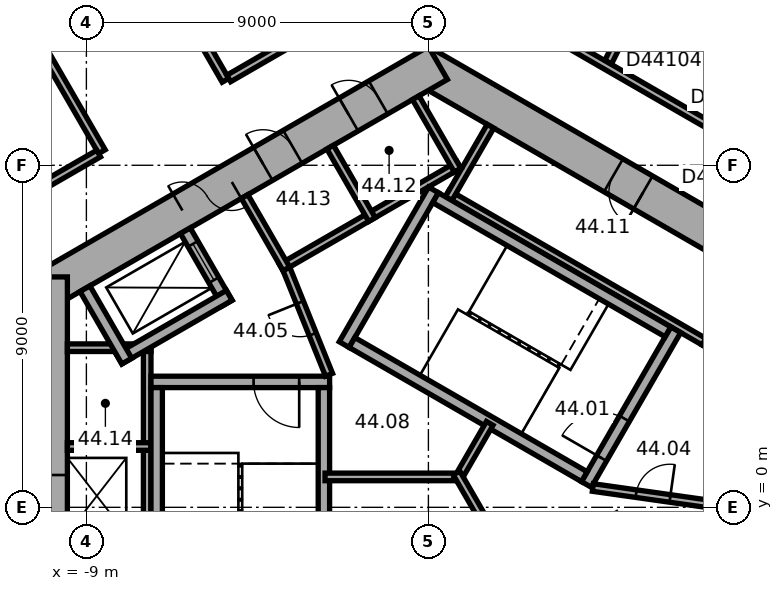
"""IFC4 building model, lengths in metres.
Left out: names, types, materials, properties, quantities, classifications, styles, units other than length and angle.
Written with IfcOpenShell. Run it as: python <this file> out.ifc"""

import sys

from ifc_helpers import new_model, si_unit, direction, frame, frame_2d, origin, place, context, subcontext, project, spatial, rectangle, extrude, element, fill, save


model = new_model("IFC4")
c1 = context("Model", 3, precision=1e-05, world=origin(), true_north=direction((0.0, 1.0)))
c2 = subcontext(c1, "Body", "Model", "MODEL_VIEW")
j1 = project(units=[si_unit("LENGTHUNIT", "METRE"), si_unit("PLANEANGLEUNIT", "RADIAN")], contexts=[c1])
p1 = place(None, origin())
s1 = spatial("IfcSite", under=j1, at=p1, CompositionType="ELEMENT")
p2 = place(p1, origin())
s2 = spatial("IfcBuilding", under=s1, at=p2, CompositionType="ELEMENT")
p3 = place(p2, frame((0.0, 0.0, 179.9)))
s3 = spatial("IfcBuildingStorey", under=s2, at=p3, CompositionType="ELEMENT", Elevation=179.9)
p4 = place(p3, frame((10.25, 5.629, 0.0), z_axis=(0.0, 0.0, 1.0), x_axis=(-0.866022616891, 0.50000482701, 0.0)))
e1 = element("IfcWall", 1, at=p4, inside=s3, PredefinedType="SHEAR", context=c2, shape_type="SweptSolid", body=[
    extrude(rectangle(XDim=12.125, YDim=1.0, at=frame_2d((6.062, 0.0))), origin(), (0.0, 0.0, 1.0), 3.7),
])
p5 = place(p4, frame((5.312, 0.0, 0.0)))
e2 = element("IfcOpeningElement", 2, at=p5, cuts=e1, PredefinedType="OPENING", context=c2, shape_type="SweptSolid", body=[
    extrude(rectangle(XDim=0.9, YDim=2.1, at=frame_2d((0.45, 1.05))), frame((0.0, 0.51, 0.0), z_axis=(0.0, -1.0, 0.0), x_axis=(1.0, 0.0, 0.0)), (0.0, 0.0, 1.0), 1.02),
])
p6 = place(p3, frame((0.25, 11.691, 0.0), z_axis=(0.0, 0.0, 1.0), x_axis=(-0.866022616891, -0.50000482701, 0.0)))
e3 = element("IfcWall", 3, at=p6, inside=s3, PredefinedType="SHEAR", context=c2, shape_type="SweptSolid", body=[
    extrude(rectangle(XDim=12.125, YDim=1.0, at=frame_2d((6.062, 0.0))), origin(), (0.0, 0.0, 1.0), 3.7),
])
p7 = place(p6, frame((6.262, 0.0, 0.0)))
e4 = element("IfcOpeningElement", 4, at=p7, cuts=e3, PredefinedType="OPENING", context=c2, shape_type="SweptSolid", body=[
    extrude(rectangle(XDim=1.5, YDim=2.1, at=frame_2d((0.75, 1.05))), frame((0.0, 0.51, 0.0), z_axis=(0.0, -1.0, 0.0), x_axis=(1.0, 0.0, 0.0)), (0.0, 0.0, 1.0), 1.02),
])
p8 = place(p6, frame((1.812, 0.0, 0.0)))
e5 = element("IfcOpeningElement", 5, at=p8, cuts=e3, PredefinedType="OPENING", context=c2, shape_type="SweptSolid", body=[
    extrude(rectangle(XDim=0.9, YDim=2.1, at=frame_2d((0.45, 1.05))), frame((0.0, 0.51, 0.0), z_axis=(0.0, -1.0, 0.0), x_axis=(1.0, 0.0, 0.0)), (0.0, 0.0, 1.0), 1.02),
])
p9 = place(p6, frame((4.412, 0.0, 0.0)))
e6 = element("IfcOpeningElement", 6, at=p9, cuts=e3, PredefinedType="OPENING", context=c2, shape_type="SweptSolid", body=[
    extrude(rectangle(XDim=0.9, YDim=2.1, at=frame_2d((0.45, 1.05))), frame((0.0, 0.51, 0.0), z_axis=(0.0, -1.0, 0.0), x_axis=(1.0, 0.0, 0.0)), (0.0, 0.0, 1.0), 1.02),
])
p10 = place(p3, frame((-10.0, 6.062, 0.0), z_axis=(0.0, 0.0, 1.0), x_axis=(0.0, -1.0, 0.0)))
e7 = element("IfcWall", 7, at=p10, inside=s3, PredefinedType="SHEAR", context=c2, shape_type="SweptSolid", body=[
    extrude(rectangle(XDim=12.125, YDim=1.0, at=frame_2d((6.062, 0.0))), origin(), (0.0, 0.0, 1.0), 3.7),
])
p11 = place(p10, frame((5.212, 0.0, 0.0)))
e8 = element("IfcOpeningElement", 8, at=p11, cuts=e7, PredefinedType="OPENING", context=c2, shape_type="SweptSolid", body=[
    extrude(rectangle(XDim=1.1, YDim=2.1, at=frame_2d((0.55, 1.05))), frame((0.0, 0.51, 0.0), z_axis=(0.0, -1.0, 0.0), x_axis=(1.0, 0.0, 0.0)), (0.0, 0.0, 1.0), 1.02),
])
p12 = place(p10, frame((7.812, 0.0, 0.0)))
e9 = element("IfcOpeningElement", 9, at=p12, cuts=e7, PredefinedType="OPENING", context=c2, shape_type="SweptSolid", body=[
    extrude(rectangle(XDim=1.1, YDim=2.1, at=frame_2d((0.55, 1.05))), frame((0.0, 0.51, 0.0), z_axis=(0.0, -1.0, 0.0), x_axis=(1.0, 0.0, 0.0)), (0.0, 0.0, 1.0), 1.02),
])
p13 = place(p3, frame((7.424, 4.259, 0.0), z_axis=(0.0, 0.0, 1.0), x_axis=(-0.866026010844, 0.49999894854, 0.0)))
e10 = element("IfcWall", 10, at=p13, inside=s3, PredefinedType="PARTITIONING", context=c2, shape_type="SweptSolid", body=[
    extrude(rectangle(XDim=8.0, YDim=0.2, at=frame_2d((4.0, 0.0))), origin(), (0.0, 0.0, 1.0), 3.42),
])
for number, where, z_axis, x_axis in (
    (11, (7.287, 4.222, 0.0), (0.0, 0.0, 1.0), (0.5, 0.866, 0.0)),
    (12, (0.532, 8.122, 0.0), (0.0, 0.0, 1.0), (0.5, 0.866, 0.0)),
):
    element("IfcWall", number, at=place(p3, frame(where, z_axis=z_axis, x_axis=x_axis)), inside=s3, PredefinedType="PARTITIONING", context=c2, shape_type="SweptSolid", body=[
        extrude(rectangle(XDim=2.2, YDim=0.2, at=frame_2d((1.1, 0.0))), origin(), (0.0, 0.0, 1.0), 3.42),
    ])
p14 = place(p3, frame((0.803, 9.009, 0.0), z_axis=(0.0, 0.0, 1.0), x_axis=(-0.866028230842, -0.499995103361, 0.0)))
e13 = element("IfcWall", 13, at=p14, inside=s3, PredefinedType="PARTITIONING", context=c2, shape_type="SweptSolid", body=[
    extrude(rectangle(XDim=5.4, YDim=0.2, at=frame_2d((2.7, 0.0))), origin(), (0.0, 0.0, 1.0), 3.42),
])
p15 = place(p3, frame((0.767, 8.872, 0.0), z_axis=(0.0, 0.0, 1.0), x_axis=(-0.499994660107, 0.866028486751, 0.0)))
e14 = element("IfcWall", 14, at=p15, inside=s3, PredefinedType="PARTITIONING", context=c2, shape_type="SweptSolid", body=[
    extrude(rectangle(XDim=2.2, YDim=0.2, at=frame_2d((1.1, 0.0))), origin(), (0.0, 0.0, 1.0), 3.42),
])
for number, where, z_axis, x_axis in (
    (15, (-1.485, 7.572, 0.0), (0.0, 0.0, 1.0), (-0.5, 0.866, 0.0)),
    (16, (-3.737, 6.272, 0.0), (0.0, 0.0, 1.0), (-0.5, 0.866, 0.0)),
):
    element("IfcWall", number, at=place(p3, frame(where, z_axis=z_axis, x_axis=x_axis)), inside=s3, PredefinedType="PARTITIONING", context=c2, shape_type="SweptSolid", body=[
        extrude(rectangle(XDim=2.2, YDim=0.2, at=frame_2d((1.1, 0.0))), origin(), (0.0, 0.0, 1.0), 3.42),
    ])
p16 = place(p3, frame((-7.4, 4.3, 0.0), z_axis=(0.0, 0.0, 1.0), x_axis=(0.0, -1.0, 0.0)))
e17 = element("IfcWall", 17, at=p16, inside=s3, PredefinedType="PARTITIONING", context=c2, shape_type="SweptSolid", body=[
    extrude(rectangle(XDim=8.0, YDim=0.2, at=frame_2d((4.0, 0.0))), origin(), (0.0, 0.0, 1.0), 3.42),
])
for number, where, z_axis, x_axis in (
    (18, (-7.3, 4.2, 0.0), (0.0, 0.0, 1.0), (-1.0, 0.0, 0.0)),
    (19, (-7.3, 1.6, 0.0), (0.0, 0.0, 1.0), (-1.0, 0.0, 0.0)),
):
    element("IfcWall", number, at=place(p3, frame(where, z_axis=z_axis, x_axis=x_axis)), inside=s3, PredefinedType="PARTITIONING", context=c2, shape_type="SweptSolid", body=[
        extrude(rectangle(XDim=2.2, YDim=0.2, at=frame_2d((1.1, 0.0))), origin(), (0.0, 0.0, 1.0), 3.42),
    ])
p17 = place(p3, frame((4.158, 0.602, 0.0), z_axis=(0.0, 0.0, 1.0), x_axis=(0.499977259774, 0.866038532462, 0.0)))
e20 = element("IfcWall", 20, at=p17, inside=s3, PredefinedType="SHEAR", context=c2, shape_type="SweptSolid", body=[
    extrude(rectangle(XDim=4.7, YDim=0.3, at=frame_2d((2.35, 0.0))), origin(), (0.0, 0.0, 1.0), 3.42),
])
p18 = place(p17, frame((0.8, 0.0, 0.0)))
e21 = element("IfcOpeningElement", 21, at=p18, cuts=e20, PredefinedType="OPENING", context=c2, shape_type="SweptSolid", body=[
    extrude(rectangle(XDim=1.2, YDim=2.1, at=frame_2d((0.6, 1.05))), frame((0.0, 0.16, 0.0), z_axis=(0.0, -1.0, 0.0), x_axis=(1.0, 0.0, 0.0)), (0.0, 0.0, 1.0), 0.32),
])
p19 = place(p3, frame((-2.216, 4.282, 0.0), z_axis=(0.0, 0.0, 1.0), x_axis=(0.499977259774, 0.866038532462, 0.0)))
e22 = element("IfcWall", 22, at=p19, inside=s3, PredefinedType="SHEAR", context=c2, shape_type="SweptSolid", body=[
    extrude(rectangle(XDim=4.7, YDim=0.3, at=frame_2d((2.35, 0.0))), origin(), (0.0, 0.0, 1.0), 3.42),
])
for number, where, z_axis, x_axis in (
    (23, (4.103, 0.807, 0.0), (0.0, 0.0, 1.0), (-0.866, 0.5, 0.0)),
    (24, (6.303, 4.617, 0.0), (0.0, 0.0, 1.0), (-0.866, 0.5, 0.0)),
):
    element("IfcWall", number, at=place(p3, frame(where, z_axis=z_axis, x_axis=x_axis)), inside=s3, PredefinedType="SHEAR", context=c2, shape_type="SweptSolid", body=[
        extrude(rectangle(XDim=7.06, YDim=0.3, at=frame_2d((3.53, 0.0))), origin(), (0.0, 0.0, 1.0), 3.42),
    ])
p20 = place(p3, frame((-2.6, 3.3, 0.0), z_axis=(0.0, 0.0, 1.0), x_axis=(-1.0, 0.0, 0.0)))
e25 = element("IfcWall", 25, at=p20, inside=s3, PredefinedType="SHEAR", context=c2, shape_type="SweptSolid", body=[
    extrude(rectangle(XDim=4.7, YDim=0.3, at=frame_2d((2.35, 0.0))), origin(), (0.0, 0.0, 1.0), 3.42),
])
p21 = place(p20, frame((0.8, 0.0, 0.0)))
e26 = element("IfcOpeningElement", 26, at=p21, cuts=e25, PredefinedType="OPENING", context=c2, shape_type="SweptSolid", body=[
    extrude(rectangle(XDim=1.2, YDim=2.1, at=frame_2d((0.6, 1.05))), frame((0.0, 0.16, 0.0), z_axis=(0.0, -1.0, 0.0), x_axis=(1.0, 0.0, 0.0)), (0.0, 0.0, 1.0), 0.32),
])
for number, where, z_axis, x_axis in (
    (27, (-2.75, 3.15, 0.0), (0.0, 0.0, 1.0), (0.0, -1.0, 0.0)),
    (28, (-7.15, 3.15, 0.0), (0.0, 0.0, 1.0), (0.0, -1.0, 0.0)),
):
    element("IfcWall", number, at=place(p3, frame(where, z_axis=z_axis, x_axis=x_axis)), inside=s3, PredefinedType="SHEAR", context=c2, shape_type="SweptSolid", body=[
        extrude(rectangle(XDim=7.06, YDim=0.3, at=frame_2d((3.53, 0.0))), origin(), (0.0, 0.0, 1.0), 3.42),
    ])
p22 = place(p3, frame((4.327, 0.521, 0.0), z_axis=(0.0, 0.0, 1.0), x_axis=(0.990124376366, -0.14019172346, 0.0)))
e29 = element("IfcWall", 29, at=p22, inside=s3, PredefinedType="PARTITIONING", context=c2, shape_type="SweptSolid", body=[
    extrude(rectangle(XDim=3.002, YDim=0.2, at=frame_2d((1.501, 0.0))), origin(), (0.0, 0.0, 1.0), 3.42),
])
p23 = place(p22, frame((1.15, 0.0, 0.0)))
e30 = element("IfcOpeningElement", 30, at=p23, cuts=e29, PredefinedType="OPENING", context=c2, shape_type="SweptSolid", body=[
    extrude(rectangle(XDim=0.9, YDim=2.1, at=frame_2d((0.45, 1.05))), frame((0.0, 0.11, 0.0), z_axis=(0.0, -1.0, 0.0), x_axis=(1.0, 0.0, 0.0)), (0.0, 0.0, 1.0), 0.22),
])
p24 = place(p3, frame((-5.295, 5.372, 0.0), z_axis=(0.0, 0.0, 1.0), x_axis=(-0.500077893725, 0.86598042715, 0.0)))
e31 = element("IfcWall", 31, at=p24, inside=s3, PredefinedType="SHEAR", context=c2, shape_type="SweptSolid", body=[
    extrude(rectangle(XDim=2.2, YDim=0.3, at=frame_2d((1.1, 0.0))), origin(), (0.0, 0.0, 1.0), 3.42),
])
p25 = place(p24, frame((0.7, 0.0, 0.0)))
e32 = element("IfcOpeningElement", 32, at=p25, cuts=e31, PredefinedType="OPENING", context=c2, shape_type="SweptSolid", body=[
    extrude(rectangle(XDim=1.1, YDim=2.1, at=frame_2d((0.55, 1.05))), frame((0.0, 0.16, 0.0), z_axis=(0.0, -1.0, 0.0), x_axis=(1.0, 0.0, 0.0)), (0.0, 0.0, 1.0), 0.32),
])
p26 = place(p3, frame((-5.24, 5.577, 0.0), z_axis=(0.0, 0.0, 1.0), x_axis=(-0.866014461049, -0.500018952895, 0.0)))
e33 = element("IfcWall", 33, at=p26, inside=s3, PredefinedType="SHEAR", context=c2, shape_type="SweptSolid", body=[
    extrude(rectangle(XDim=3.35, YDim=0.3, at=frame_2d((1.675, 0.0))), origin(), (0.0, 0.0, 1.0), 3.42),
])
p27 = place(p3, frame((-7.937, 3.847, 0.0), z_axis=(0.0, 0.0, 1.0), x_axis=(-0.50002983664, 0.866008176907, 0.0)))
e34 = element("IfcWall", 34, at=p27, inside=s3, PredefinedType="SHEAR", context=c2, shape_type="SweptSolid", body=[
    extrude(rectangle(XDim=2.2, YDim=0.3, at=frame_2d((1.1, 0.0))), origin(), (0.0, 0.0, 1.0), 3.42),
])
p28 = place(p3, frame((-2.615, 3.487, 0.0), z_axis=(0.0, 0.0, 1.0), x_axis=(-0.373576831041, 0.92759924068, 0.0)))
e35 = element("IfcWall", 35, at=p28, inside=s3, PredefinedType="PARTITIONING", context=c2, shape_type="SweptSolid", body=[
    extrude(rectangle(XDim=3.002, YDim=0.2, at=frame_2d((1.501, 0.0))), origin(), (0.0, 0.0, 1.0), 3.42),
])
p29 = place(p28, frame((1.15, 0.0, 0.0)))
e36 = element("IfcOpeningElement", 36, at=p29, cuts=e35, PredefinedType="OPENING", context=c2, shape_type="SweptSolid", body=[
    extrude(rectangle(XDim=0.9, YDim=2.1, at=frame_2d((0.45, 1.05))), frame((0.0, 0.11, 0.0), z_axis=(0.0, -1.0, 0.0), x_axis=(1.0, 0.0, 0.0)), (0.0, 0.0, 1.0), 0.22),
])
p30 = place(p3, frame((0.92, 0.8, 0.0), z_axis=(0.0, 0.0, 1.0), x_axis=(-1.0, 0.0, 0.0)))
e37 = element("IfcWall", 37, at=p30, inside=s3, PredefinedType="PARTITIONING", context=c2, shape_type="SweptSolid", body=[
    extrude(rectangle(XDim=3.64, YDim=0.2, at=frame_2d((1.82, 0.0))), origin(), (0.0, 0.0, 1.0), 3.42),
])
p31 = place(p3, frame((0.74, 0.696, 0.0), z_axis=(0.0, 0.0, 1.0), x_axis=(0.499956301907, 0.86605063142, 0.0)))
e38 = element("IfcWall", 38, at=p31, inside=s3, PredefinedType="PARTITIONING", context=c2, shape_type="SweptSolid", body=[
    extrude(rectangle(XDim=1.747, YDim=0.2, at=frame_2d((0.874, 0.0))), origin(), (0.0, 0.0, 1.0), 3.42),
])
p32 = place(p3, frame((0.74, 0.904, 0.0), z_axis=(0.0, 0.0, 1.0), x_axis=(0.500028278809, -0.866009076391, 0.0)))
e39 = element("IfcWall", 39, at=p32, inside=s3, PredefinedType="PARTITIONING", context=c2, shape_type="SweptSolid", body=[
    extrude(rectangle(XDim=3.133, YDim=0.2, at=frame_2d((1.566, 0.0))), origin(), (0.0, 0.0, 1.0), 3.42),
])
p33 = place(p3, frame((-12.766, 16.589, 0.0), z_axis=(0.0, 0.0, 1.0), x_axis=(0.500010139422, -0.866019549707, 0.0)))
e40 = element("IfcWall", 40, at=p33, inside=s3, PredefinedType="PARTITIONING", context=c2, shape_type="SweptSolid", body=[
    extrude(rectangle(XDim=8.35, YDim=0.2, at=frame_2d((4.175, 0.0))), origin(), (0.0, 0.0, 1.0), 3.42),
])
p34 = place(p33, frame((3.675, 0.0, 0.0)))
e41 = element("IfcOpeningElement", 41, at=p34, cuts=e40, PredefinedType="OPENING", context=c2, shape_type="SweptSolid", body=[
    extrude(rectangle(XDim=1.0, YDim=2.1, at=frame_2d((0.5, 1.05))), frame((0.0, 0.11, 0.0), z_axis=(0.0, -1.0, 0.0), x_axis=(1.0, 0.0, 0.0)), (0.0, 0.0, 1.0), 0.22),
])
p35 = place(p3, frame((-9.515, 18.466, 0.0), z_axis=(0.0, 0.0, 1.0), x_axis=(0.500010139422, -0.866019549707, 0.0)))
e42 = element("IfcWall", 42, at=p35, inside=s3, PredefinedType="PARTITIONING", context=c2, shape_type="SweptSolid", body=[
    extrude(rectangle(XDim=8.35, YDim=0.2, at=frame_2d((4.175, 0.0))), origin(), (0.0, 0.0, 1.0), 2.87),
])
p36 = place(p35, frame((3.675, 0.0, 0.0)))
e43 = element("IfcOpeningElement", 43, at=p36, cuts=e42, PredefinedType="OPENING", context=c2, shape_type="SweptSolid", body=[
    extrude(rectangle(XDim=1.0, YDim=2.1, at=frame_2d((0.5, 1.05))), frame((0.0, 0.11, 0.0), z_axis=(0.0, -1.0, 0.0), x_axis=(1.0, 0.0, 0.0)), (0.0, 0.0, 1.0), 0.22),
])
p37 = place(p3, frame((-8.678, 9.308, 0.0), z_axis=(0.0, 0.0, 1.0), x_axis=(-0.866000359435, -0.500043375578, 0.0)))
e44 = element("IfcWall", 44, at=p37, inside=s3, PredefinedType="PARTITIONING", context=c2, shape_type="SweptSolid", body=[
    extrude(rectangle(XDim=3.161, YDim=0.2, at=frame_2d((1.581, 0.0))), origin(), (0.0, 0.0, 1.0), 3.42),
])
p38 = place(p3, frame((-1.167, 13.645, 0.0), z_axis=(0.0, 0.0, 1.0), x_axis=(-0.866034830959, -0.499983671299, 0.0)))
e45 = element("IfcWall", 45, at=p38, inside=s3, PredefinedType="PARTITIONING", context=c2, shape_type="SweptSolid", body=[
    extrude(rectangle(XDim=4.719, YDim=0.2, at=frame_2d((2.36, 0.0))), origin(), (0.0, 0.0, 1.0), 3.42),
])
p39 = place(p3, frame((8.37, 19.013, 0.0), z_axis=(0.0, 0.0, 1.0), x_axis=(-0.446183598632, -0.894941448538, 0.0)))
e46 = element("IfcWall", 46, at=p39, inside=s3, PredefinedType="PARTITIONING", context=c2, shape_type="SweptSolid", body=[
    extrude(rectangle(XDim=8.156, YDim=0.2, at=frame_2d((4.078, 0.0))), origin(), (0.0, 0.0, 1.0), 3.42),
])
p40 = place(p3, frame((11.196, 7.854, 0.0), z_axis=(0.0, 0.0, 1.0), x_axis=(-0.866023877043, 0.500002644385, 0.0)))
e47 = element("IfcWall", 47, at=p40, inside=s3, PredefinedType="PARTITIONING", context=c2, shape_type="SweptSolid", body=[
    extrude(rectangle(XDim=11.792, YDim=0.2, at=frame_2d((5.896, 0.0))), origin(), (0.0, 0.0, 1.0), 3.42),
])
p41 = place(p40, frame((3.261, 0.0, 0.0)))
e48 = element("IfcOpeningElement", 48, at=p41, cuts=e47, PredefinedType="OPENING", context=c2, shape_type="SweptSolid", body=[
    extrude(rectangle(XDim=1.0, YDim=2.1, at=frame_2d((0.5, 1.05))), frame((0.0, 0.11, 0.0), z_axis=(0.0, -1.0, 0.0), x_axis=(1.0, 0.0, 0.0)), (0.0, 0.0, 1.0), 0.22),
])
p42 = place(p3, frame((11.959, 9.608, 0.0), z_axis=(0.0, 0.0, 1.0), x_axis=(-0.866018452427, 0.500012039911, 0.0)))
e49 = element("IfcWall", 49, at=p42, inside=s3, PredefinedType="PARTITIONING", context=c2, shape_type="SweptSolid", body=[
    extrude(rectangle(XDim=7.322, YDim=0.12, at=frame_2d((3.661, 0.0))), origin(), (0.0, 0.0, 1.0), 3.42),
])
p43 = place(p42, frame((5.858, 0.0, 0.0)))
e50 = element("IfcOpeningElement", 50, at=p43, cuts=e49, PredefinedType="OPENING", context=c2, shape_type="SweptSolid", body=[
    extrude(rectangle(XDim=1.0, YDim=2.1, at=frame_2d((0.5, 1.05))), frame((0.0, 0.07, 0.0), z_axis=(0.0, -1.0, 0.0), x_axis=(1.0, 0.0, 0.0)), (0.0, 0.0, 1.0), 0.14),
])
p44 = place(p42, frame((1.25, 0.0, 0.0)))
e51 = element("IfcOpeningElement", 51, at=p44, cuts=e49, PredefinedType="OPENING", context=c2, shape_type="SweptSolid", body=[
    extrude(rectangle(XDim=0.9, YDim=2.1, at=frame_2d((0.45, 1.05))), frame((0.0, 0.07, 0.0), z_axis=(0.0, -1.0, 0.0), x_axis=(1.0, 0.0, 0.0)), (0.0, 0.0, 1.0), 0.14),
])
p45 = place(p42, frame((3.947, 0.0, 0.0)))
e52 = element("IfcOpeningElement", 52, at=p45, cuts=e49, PredefinedType="OPENING", context=c2, shape_type="SweptSolid", body=[
    extrude(rectangle(XDim=0.9, YDim=2.1, at=frame_2d((0.45, 1.05))), frame((0.0, 0.07, 0.0), z_axis=(0.0, -1.0, 0.0), x_axis=(1.0, 0.0, 0.0)), (0.0, 0.0, 1.0), 0.14),
])
p46 = place(p7, origin())
e53 = element("IfcDoor", 53, at=p46, inside=s3, OperationType="DOUBLE_DOOR_SINGLE_SWING", PredefinedType="DOOR", context=c2, shape_type="SweptSolid", body=[
    extrude(rectangle(XDim=1.5, YDim=2.1, at=frame_2d((0.75, 1.05))), frame((0.0, 0.025, 0.0), z_axis=(0.0, -1.0, 0.0), x_axis=(1.0, 0.0, 0.0)), (0.0, 0.0, 1.0), 0.05),
])
fill(e4, e53)
p47 = place(p18, origin())
e54 = element("IfcDoor", 54, at=p47, inside=s3, OperationType="SINGLE_SWING_RIGHT", PredefinedType="DOOR", context=c2, shape_type="SweptSolid", body=[
    extrude(rectangle(XDim=1.2, YDim=2.1, at=frame_2d((0.6, 1.05))), frame((0.0, 0.025, 0.0), z_axis=(0.0, -1.0, 0.0), x_axis=(1.0, 0.0, 0.0)), (0.0, 0.0, 1.0), 0.05),
])
fill(e21, e54)
p48 = place(p21, origin())
e55 = element("IfcDoor", 55, at=p48, inside=s3, OperationType="SINGLE_SWING_RIGHT", PredefinedType="DOOR", context=c2, shape_type="SweptSolid", body=[
    extrude(rectangle(XDim=1.2, YDim=2.1, at=frame_2d((0.6, 1.05))), frame((0.0, 0.025, 0.0), z_axis=(0.0, -1.0, 0.0), x_axis=(1.0, 0.0, 0.0)), (0.0, 0.0, 1.0), 0.05),
])
fill(e26, e55)
p49 = place(p23, origin())
e56 = element("IfcDoor", 56, at=p49, inside=s3, OperationType="SINGLE_SWING_LEFT", PredefinedType="DOOR", context=c2, shape_type="SweptSolid", body=[
    extrude(rectangle(XDim=0.9, YDim=2.1, at=frame_2d((0.45, 1.05))), frame((0.0, 0.025, 0.0), z_axis=(0.0, -1.0, 0.0), x_axis=(1.0, 0.0, 0.0)), (0.0, 0.0, 1.0), 0.05),
])
fill(e30, e56)
p50 = place(p29, origin())
e57 = element("IfcDoor", 57, at=p50, inside=s3, OperationType="SINGLE_SWING_LEFT", PredefinedType="DOOR", context=c2, shape_type="SweptSolid", body=[
    extrude(rectangle(XDim=0.9, YDim=2.1, at=frame_2d((0.45, 1.05))), frame((0.0, 0.025, 0.0), z_axis=(0.0, -1.0, 0.0), x_axis=(1.0, 0.0, 0.0)), (0.0, 0.0, 1.0), 0.05),
])
fill(e36, e57)
p51 = place(p5, origin())
e58 = element("IfcDoor", 58, at=p51, inside=s3, OperationType="SINGLE_SWING_LEFT", PredefinedType="DOOR", context=c2, shape_type="SweptSolid", body=[
    extrude(rectangle(XDim=0.9, YDim=2.1, at=frame_2d((0.45, 1.05))), frame((0.0, 0.025, 0.0), z_axis=(0.0, -1.0, 0.0), x_axis=(1.0, 0.0, 0.0)), (0.0, 0.0, 1.0), 0.05),
])
fill(e2, e58)
p52 = place(p8, origin())
e59 = element("IfcDoor", 59, at=p52, inside=s3, OperationType="SINGLE_SWING_LEFT", PredefinedType="DOOR", context=c2, shape_type="SweptSolid", body=[
    extrude(rectangle(XDim=0.9, YDim=2.1, at=frame_2d((0.45, 1.05))), frame((0.0, 0.025, 0.0), z_axis=(0.0, -1.0, 0.0), x_axis=(1.0, 0.0, 0.0)), (0.0, 0.0, 1.0), 0.05),
])
fill(e5, e59)
p53 = place(p9, origin())
e60 = element("IfcDoor", 60, at=p53, inside=s3, OperationType="SINGLE_SWING_LEFT", PredefinedType="DOOR", context=c2, shape_type="SweptSolid", body=[
    extrude(rectangle(XDim=0.9, YDim=2.1, at=frame_2d((0.45, 1.05))), frame((0.0, 0.025, 0.0), z_axis=(0.0, -1.0, 0.0), x_axis=(1.0, 0.0, 0.0)), (0.0, 0.0, 1.0), 0.05),
])
fill(e6, e60)
p54 = place(p25, origin())
e61 = element("IfcDoor", 61, at=p54, inside=s3, OperationType="DOUBLE_DOOR_SLIDING", PredefinedType="DOOR", context=c2, shape_type="SweptSolid", body=[
    extrude(rectangle(XDim=1.1, YDim=2.1, at=frame_2d((0.55, 1.05))), frame((0.0, 0.025, 0.0), z_axis=(0.0, -1.0, 0.0), x_axis=(1.0, 0.0, 0.0)), (0.0, 0.0, 1.0), 0.05),
])
fill(e32, e61)
save(model, sys.argv[1])
